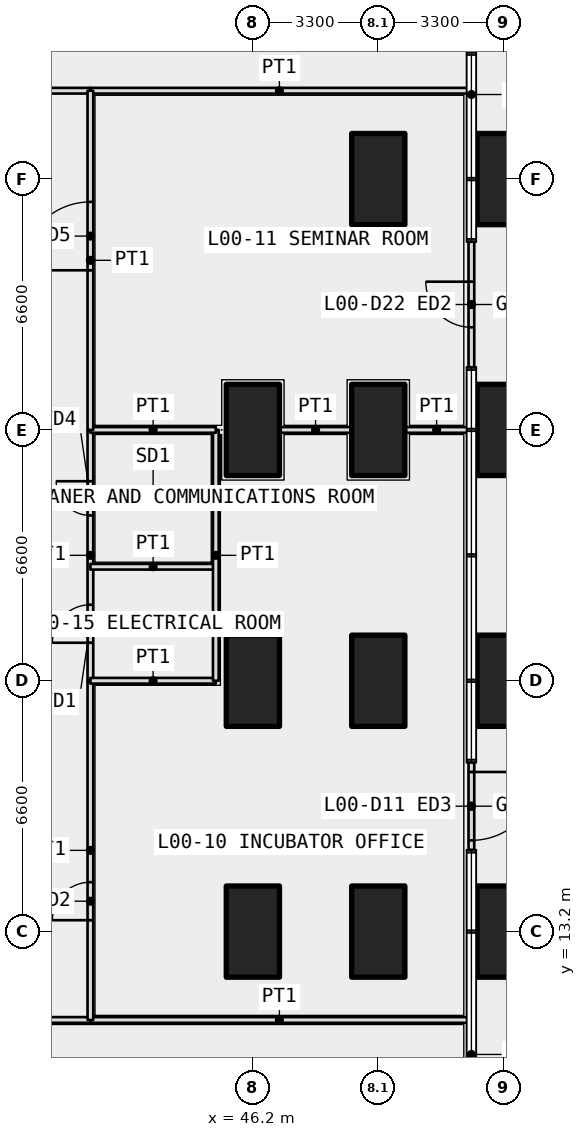
"""IFC4 building model, lengths in metres.
Left out: names, types, materials, properties, quantities, classifications, styles, units other than length and angle.
Written with IfcOpenShell. Run it as: python <this file> out.ifc"""

import sys

from ifc_helpers import new_model, si_unit, direction, frame, frame_2d, origin, origin_2d, place, context, subcontext, project, spatial, rectangle, extrude, element, fill, save


model = new_model("IFC4")
c1 = context("Model", 3, precision=1e-05, world=origin(), true_north=direction((0.0, 1.0)))
c2 = subcontext(c1, "Body", "Model", "MODEL_VIEW")
j1 = project(units=[si_unit("LENGTHUNIT", "METRE"), si_unit("PLANEANGLEUNIT", "RADIAN")], contexts=[c1])
p1 = place(None, origin())
s1 = spatial("IfcSite", under=j1, at=p1, CompositionType="ELEMENT")
p2 = place(p1, origin())
s2 = spatial("IfcBuilding", under=s1, at=p2, CompositionType="ELEMENT")
p3 = place(p2, origin())
s3 = spatial("IfcBuildingStorey", under=s2, at=p3, CompositionType="ELEMENT", Elevation=0.0)
for number, where, z_axis, x_axis in (
    (1, (52.8, 13.2, 0.0), (0.0, 0.0, 1.0), (0.0, 1.0, 0.0)),
    (2, (52.8, 19.8, 0.0), (0.0, 0.0, 1.0), (0.0, 1.0, 0.0)),
    (3, (52.8, 26.4, 0.0), (0.0, 0.0, 1.0), (0.0, 1.0, 0.0)),
    (4, (52.8, 33.0, 0.0), (0.0, 0.0, 1.0), (0.0, 1.0, 0.0)),
    (5, (49.5, 13.2, 0.0), (0.0, 0.0, 1.0), (0.0, 1.0, 0.0)),
    (6, (49.5, 19.8, 0.0), (0.0, 0.0, 1.0), (0.0, 1.0, 0.0)),
    (7, (49.5, 26.4, 0.0), (0.0, 0.0, 1.0), (0.0, 1.0, 0.0)),
    (8, (49.5, 33.0, 0.0), (0.0, 0.0, 1.0), (0.0, 1.0, 0.0)),
    (9, (46.2, 13.2, 0.0), (0.0, 0.0, 1.0), (0.0, 1.0, 0.0)),
    (10, (46.2, 19.8, 0.0), (0.0, 0.0, 1.0), (0.0, 1.0, 0.0)),
    (11, (46.2, 26.4, 0.0), (0.0, 0.0, 1.0), (0.0, 1.0, 0.0)),
):
    element("IfcColumn", number, at=place(p3, frame(where, z_axis=z_axis, x_axis=x_axis)), inside=s3, PredefinedType="COLUMN", context=c2, shape_type="SweptSolid", body=[
        extrude(rectangle(XDim=2.4, YDim=1.4, at=origin_2d()), origin(), (0.0, 0.0, 1.0), 7.2),
    ])
p4 = place(p3, frame((51.95, 28.05, 0.0), z_axis=(0.0, 0.0, 1.0), x_axis=(0.0, 1.0, 0.0)))
e12 = element("IfcWall", 12, at=p4, inside=s3, PredefinedType="SOLIDWALL", context=c2, shape_type="SweptSolid", body=[
    extrude(rectangle(XDim=3.3, YDim=0.15, at=frame_2d((1.65, 0.0))), origin(), (0.0, 0.0, 1.0), 6.9),
])
p5 = place(p4, frame((1.05, 0.0, 0.0)))
e13 = element("IfcOpeningElement", 13, at=p5, cuts=e12, PredefinedType="OPENING", context=c2, shape_type="SweptSolid", body=[
    extrude(rectangle(XDim=1.2, YDim=2.4, at=frame_2d((0.6, 1.2))), frame((0.0, 0.085, 0.0), z_axis=(0.0, -1.0, 0.0), x_axis=(1.0, 0.0, 0.0)), (0.0, 0.0, 1.0), 0.17),
])
p6 = place(p3, frame((51.95, 17.65, 0.0), z_axis=(0.0, 0.0, 1.0), x_axis=(0.0, -1.0, 0.0)))
e14 = element("IfcWall", 14, at=p6, inside=s3, PredefinedType="SOLIDWALL", context=c2, shape_type="SweptSolid", body=[
    extrude(rectangle(XDim=2.3, YDim=0.15, at=frame_2d((1.15, 0.0))), origin(), (0.0, 0.0, 1.0), 6.9),
])
p7 = place(p6, frame((0.25, 0.0, 0.0)))
e15 = element("IfcOpeningElement", 15, at=p7, cuts=e14, PredefinedType="OPENING", context=c2, shape_type="SweptSolid", body=[
    extrude(rectangle(XDim=1.8, YDim=2.4, at=frame_2d((0.9, 1.2))), frame((0.0, 0.085, 0.0), z_axis=(0.0, -1.0, 0.0), x_axis=(1.0, 0.0, 0.0)), (0.0, 0.0, 1.0), 0.17),
])
p8 = place(p3, frame((41.925, 19.8, 0.0), z_axis=(0.0, 0.0, 1.0), x_axis=(0.0, 1.0, 0.0)))
e16 = element("IfcWall", 16, at=p8, inside=s3, PredefinedType="PARTITIONING", context=c2, shape_type="SweptSolid", body=[
    extrude(rectangle(XDim=6.6, YDim=0.15, at=frame_2d((3.3, 0.0))), origin(), (0.0, 0.0, 1.0), 5.85),
])
p9 = place(p8, frame((1.0, 0.0, 0.0)))
e17 = element("IfcOpeningElement", 17, at=p9, cuts=e16, PredefinedType="OPENING", context=c2, shape_type="SweptSolid", body=[
    extrude(rectangle(XDim=1.0, YDim=2.1, at=frame_2d((0.5, 1.05))), frame((0.0, 0.085, 0.0), z_axis=(0.0, -1.0, 0.0), x_axis=(1.0, 0.0, 0.0)), (0.0, 0.0, 1.0), 0.17),
])
p10 = place(p8, frame((4.35, 0.0, 0.0)))
e18 = element("IfcOpeningElement", 18, at=p10, cuts=e16, PredefinedType="OPENING", context=c2, shape_type="SweptSolid", body=[
    extrude(rectangle(XDim=0.9, YDim=2.1, at=frame_2d((0.45, 1.05))), frame((0.0, 0.085, 0.0), z_axis=(0.0, -1.0, 0.0), x_axis=(1.0, 0.0, 0.0)), (0.0, 0.0, 1.0), 0.17),
])
p11 = place(p3, frame((41.925, 22.8, 0.0), z_axis=(0.0, 0.0, 1.0), x_axis=(1.0, 0.0, 0.0)))
e19 = element("IfcWall", 19, at=p11, inside=s3, PredefinedType="PARTITIONING", context=c2, shape_type="SweptSolid", body=[
    extrude(rectangle(XDim=3.3, YDim=0.15, at=frame_2d((1.65, 0.0))), origin(), (0.0, 0.0, 1.0), 6.9),
])
p12 = place(p3, frame((33.0, 10.875, 0.0), z_axis=(0.0, 0.0, 1.0), x_axis=(1.0, 0.0, 0.0)))
e20 = element("IfcWall", 20, at=p12, inside=s3, PredefinedType="PARTITIONING", context=c2, shape_type="SweptSolid", body=[
    extrude(rectangle(XDim=8.925, YDim=0.15, at=frame_2d((4.462, 0.0))), origin(), (0.0, 0.0, 1.0), 4.5),
])
p13 = place(p12, frame((4.1, 0.0, 0.0)))
e21 = element("IfcOpeningElement", 21, at=p13, cuts=e20, PredefinedType="OPENING", context=c2, shape_type="SweptSolid", body=[
    extrude(rectangle(XDim=1.8, YDim=2.1, at=frame_2d((0.9, 1.05))), frame((0.0, 0.085, 0.0), z_axis=(0.0, -1.0, 0.0), x_axis=(1.0, 0.0, 0.0)), (0.0, 0.0, 1.0), 0.17),
])
p14 = place(p3, frame((41.925, 35.325, 0.0), z_axis=(0.0, 0.0, 1.0), x_axis=(-1.0, 0.0, 0.0)))
e22 = element("IfcWall", 22, at=p14, inside=s3, PredefinedType="PARTITIONING", context=c2, shape_type="SweptSolid", body=[
    extrude(rectangle(XDim=8.925, YDim=0.15, at=frame_2d((4.462, 0.0))), origin(), (0.0, 0.0, 1.0), 5.85),
])
p15 = place(p14, frame((5.025, 0.0, 0.0)))
e23 = element("IfcOpeningElement", 23, at=p15, cuts=e22, PredefinedType="OPENING", context=c2, shape_type="SweptSolid", body=[
    extrude(rectangle(XDim=1.8, YDim=2.4, at=frame_2d((0.9, 1.2))), frame((0.0, 0.085, 0.0), z_axis=(0.0, -1.0, 0.0), x_axis=(1.0, 0.0, 0.0)), (0.0, 0.0, 1.0), 0.17),
])
p16 = place(p3, frame((41.925, 10.875, 0.0), z_axis=(0.0, 0.0, 1.0), x_axis=(1.0, 0.0, 0.0)))
e24 = element("IfcWall", 24, at=p16, inside=s3, PredefinedType="PARTITIONING", context=c2, shape_type="SweptSolid", body=[
    extrude(rectangle(XDim=9.945, YDim=0.15, at=frame_2d((4.973, 0.0))), origin(), (0.0, 0.0, 1.0), 5.85),
])
p17 = place(p3, frame((41.925, 10.875, 0.0), z_axis=(0.0, 0.0, 1.0), x_axis=(0.0, 1.0, 0.0)))
e25 = element("IfcWall", 25, at=p17, inside=s3, PredefinedType="PARTITIONING", context=c2, shape_type="SweptSolid", body=[
    extrude(rectangle(XDim=8.925, YDim=0.15, at=frame_2d((4.462, 0.0))), origin(), (0.0, 0.0, 1.0), 5.85),
])
p18 = place(p17, frame((2.625, 0.0, 0.0)))
e26 = element("IfcOpeningElement", 26, at=p18, cuts=e25, PredefinedType="OPENING", context=c2, shape_type="SweptSolid", body=[
    extrude(rectangle(XDim=1.0, YDim=2.1, at=frame_2d((0.5, 1.05))), frame((0.0, 0.085, 0.0), z_axis=(0.0, -1.0, 0.0), x_axis=(1.0, 0.0, 0.0)), (0.0, 0.0, 1.0), 0.17),
])
p19 = place(p3, frame((41.925, 19.8, 0.0), z_axis=(0.0, 0.0, 1.0), x_axis=(1.0, 0.0, 0.0)))
e27 = element("IfcWall", 27, at=p19, inside=s3, PredefinedType="PARTITIONING", context=c2, shape_type="SweptSolid", body=[
    extrude(rectangle(XDim=3.3, YDim=0.15, at=frame_2d((1.65, 0.0))), origin(), (0.0, 0.0, 1.0), 5.85),
])
p20 = place(p3, frame((45.225, 19.8, 0.0), z_axis=(0.0, 0.0, 1.0), x_axis=(0.0, 1.0, 0.0)))
e28 = element("IfcWall", 28, at=p20, inside=s3, PredefinedType="PARTITIONING", context=c2, shape_type="SweptSolid", body=[
    extrude(rectangle(XDim=6.6, YDim=0.15, at=frame_2d((3.3, 0.0))), origin(), (0.0, 0.0, 1.0), 5.85),
])
p21 = place(p3, frame((51.87, 35.325, 0.0), z_axis=(0.0, 0.0, 1.0), x_axis=(-1.0, 0.0, 0.0)))
e29 = element("IfcWall", 29, at=p21, inside=s3, PredefinedType="PARTITIONING", context=c2, shape_type="SweptSolid", body=[
    extrude(rectangle(XDim=9.945, YDim=0.15, at=frame_2d((4.973, 0.0))), origin(), (0.0, 0.0, 1.0), 5.85),
])
p22 = place(p3, frame((45.225, 26.4, 0.0), z_axis=(0.0, 0.0, 1.0), x_axis=(-1.0, 0.0, 0.0)))
e30 = element("IfcWall", 30, at=p22, inside=s3, PredefinedType="PARTITIONING", context=c2, shape_type="SweptSolid", body=[
    extrude(rectangle(XDim=3.3, YDim=0.15, at=frame_2d((1.65, 0.0))), origin(), (0.0, 0.0, 1.0), 5.85),
])
p23 = place(p3, frame((41.925, 26.4, 0.0), z_axis=(0.0, 0.0, 1.0), x_axis=(0.0, 1.0, 0.0)))
e31 = element("IfcWall", 31, at=p23, inside=s3, PredefinedType="PARTITIONING", context=c2, shape_type="SweptSolid", body=[
    extrude(rectangle(XDim=8.925, YDim=0.15, at=frame_2d((4.462, 0.0))), origin(), (0.0, 0.0, 1.0), 4.5),
])
p24 = place(p23, frame((4.2, 0.0, 0.0)))
e32 = element("IfcOpeningElement", 32, at=p24, cuts=e31, PredefinedType="OPENING", context=c2, shape_type="SweptSolid", body=[
    extrude(rectangle(XDim=1.8, YDim=2.1, at=frame_2d((0.9, 1.05))), frame((0.0, 0.085, 0.0), z_axis=(0.0, -1.0, 0.0), x_axis=(1.0, 0.0, 0.0)), (0.0, 0.0, 1.0), 0.17),
])
p25 = place(p3, frame((46.9, 26.4, 0.0), z_axis=(0.0, 0.0, 1.0), x_axis=(1.0, 0.0, 0.0)))
e33 = element("IfcWall", 33, at=p25, inside=s3, PredefinedType="PARTITIONING", context=c2, shape_type="SweptSolid", body=[
    extrude(rectangle(XDim=1.9, YDim=0.15, at=frame_2d((0.95, 0.0))), origin(), (0.0, 0.0, 1.0), 5.85),
])
p26 = place(p3, frame((50.2, 26.4, 0.0), z_axis=(0.0, 0.0, 1.0), x_axis=(1.0, 0.0, 0.0)))
e34 = element("IfcWall", 34, at=p26, inside=s3, PredefinedType="PARTITIONING", context=c2, shape_type="SweptSolid", body=[
    extrude(rectangle(XDim=1.67, YDim=0.15, at=frame_2d((0.835, 0.0))), origin(), (0.0, 0.0, 1.0), 5.85),
])
p27 = place(p5, origin())
e35 = element("IfcDoor", 35, at=p27, inside=s3, OperationType="SINGLE_SWING_RIGHT", PredefinedType="DOOR", context=c2, shape_type="SweptSolid", body=[
    extrude(rectangle(XDim=1.2, YDim=2.4, at=frame_2d((0.6, 1.2))), frame((0.0, 0.025, 0.0), z_axis=(0.0, -1.0, 0.0), x_axis=(1.0, 0.0, 0.0)), (0.0, 0.0, 1.0), 0.05),
])
fill(e13, e35)
p28 = place(p7, origin())
e36 = element("IfcDoor", 36, at=p28, inside=s3, OperationType="DOUBLE_DOOR_SINGLE_SWING", PredefinedType="DOOR", context=c2, shape_type="SweptSolid", body=[
    extrude(rectangle(XDim=1.8, YDim=2.4, at=frame_2d((0.9, 1.2))), frame((0.0, 0.025, 0.0), z_axis=(0.0, -1.0, 0.0), x_axis=(1.0, 0.0, 0.0)), (0.0, 0.0, 1.0), 0.05),
])
fill(e15, e36)
p29 = place(p9, origin())
e37 = element("IfcDoor", 37, at=p29, inside=s3, OperationType="SINGLE_SWING_LEFT", PredefinedType="DOOR", context=c2, shape_type="SweptSolid", body=[
    extrude(rectangle(XDim=1.0, YDim=2.1, at=frame_2d((0.5, 1.05))), frame((0.0, 0.025, 0.0), z_axis=(0.0, -1.0, 0.0), x_axis=(1.0, 0.0, 0.0)), (0.0, 0.0, 1.0), 0.05),
])
fill(e17, e37)
p30 = place(p10, origin())
e38 = element("IfcDoor", 38, at=p30, inside=s3, OperationType="SINGLE_SWING_RIGHT", PredefinedType="DOOR", context=c2, shape_type="SweptSolid", body=[
    extrude(rectangle(XDim=0.9, YDim=2.1, at=frame_2d((0.45, 1.05))), frame((0.0, 0.025, 0.0), z_axis=(0.0, -1.0, 0.0), x_axis=(1.0, 0.0, 0.0)), (0.0, 0.0, 1.0), 0.05),
])
fill(e18, e38)
p31 = place(p18, origin())
e39 = element("IfcDoor", 39, at=p31, inside=s3, OperationType="SINGLE_SWING_LEFT", PredefinedType="DOOR", context=c2, shape_type="SweptSolid", body=[
    extrude(rectangle(XDim=1.0, YDim=2.1, at=frame_2d((0.5, 1.05))), frame((0.0, 0.025, 0.0), z_axis=(0.0, -1.0, 0.0), x_axis=(1.0, 0.0, 0.0)), (0.0, 0.0, 1.0), 0.05),
])
fill(e26, e39)
p32 = place(p24, origin())
e40 = element("IfcDoor", 40, at=p32, inside=s3, OperationType="DOUBLE_DOOR_DOUBLE_SWING", PredefinedType="DOOR", context=c2, shape_type="SweptSolid", body=[
    extrude(rectangle(XDim=1.8, YDim=2.1, at=frame_2d((0.9, 1.05))), frame((0.0, 0.025, 0.0), z_axis=(0.0, -1.0, 0.0), x_axis=(1.0, 0.0, 0.0)), (0.0, 0.0, 1.0), 0.05),
])
fill(e32, e40)
save(model, sys.argv[1])
